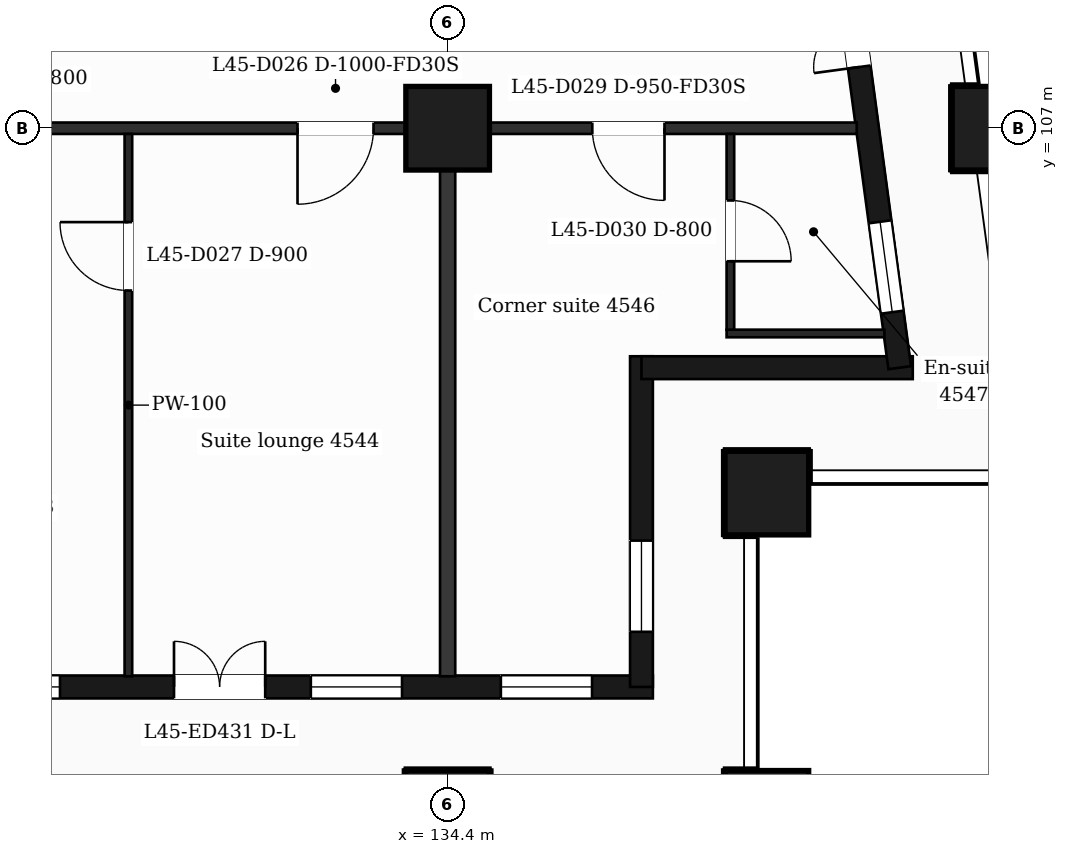
"""IFC4 building model, lengths in metres.
Left out: names, types, materials, properties, quantities, classifications, styles, units other than length and angle.
Written with IfcOpenShell. Run it as: python <this file> out.ifc"""

import sys

from ifc_helpers import new_model, si_unit, direction, frame, frame_2d, origin, origin_2d, place, context, subcontext, project, spatial, rectangle, extrude, element, fill, save


model = new_model("IFC4")
c1 = context("Model", 3, precision=1e-05, world=origin(), true_north=direction((0.0, 1.0)))
c2 = subcontext(c1, "Body", "Model", "MODEL_VIEW")
j1 = project(units=[si_unit("LENGTHUNIT", "METRE"), si_unit("PLANEANGLEUNIT", "RADIAN")], contexts=[c1])
p1 = place(None, origin())
s1 = spatial("IfcSite", under=j1, at=p1, CompositionType="ELEMENT")
p2 = place(p1, origin())
s2 = spatial("IfcBuilding", under=s1, at=p2, CompositionType="ELEMENT")
p3 = place(p2, frame((0.0, 0.0, 188.5)))
s3 = spatial("IfcBuildingStorey", under=s2, at=p3, CompositionType="ELEMENT", Elevation=188.5)
for number, where, z_axis, x_axis in (
    (1, (134.4, 98.0, 0.0), (0.0, 0.0, 1.0), (1.0, 0.0, 0.0)),
    (2, (138.6, 98.0, 0.0), (0.0, 0.0, 1.0), (1.0, 0.0, 0.0)),
    (3, (138.6, 102.2, 0.0), (0.0, 0.0, 1.0), (1.0, 0.0, 0.0)),
    (4, (134.4, 107.0, 0.0), (0.0, 0.0, 1.0), (1.0, 0.0, 0.0)),
    (5, (141.588, 107.0, 0.0), (0.0, 0.0, 1.0), (1.0, 0.0, 0.0)),
):
    element("IfcColumn", number, at=place(p3, frame(where, z_axis=z_axis, x_axis=x_axis)), inside=s3, PredefinedType="COLUMN", context=c2, shape_type="SweptSolid", body=[
        extrude(rectangle(XDim=1.1, YDim=1.1, at=origin_2d()), origin(), (0.0, 0.0, 1.0), 3.7),
    ])
p4 = place(p3, frame((89.85, 99.65, 0.0), z_axis=(0.0, 0.0, 1.0), x_axis=(1.0, 0.0, 0.0)))
e6 = element("IfcWall", 6, at=p4, inside=s3, PredefinedType="SOLIDWALL", context=c2, shape_type="SweptSolid", body=[
    extrude(rectangle(XDim=47.25, YDim=0.3, at=frame_2d((23.625, 0.0))), origin(), (0.0, 0.0, 1.0), 3.25),
])
p5 = place(p4, frame((0.725, 0.0, 0.9)))
e7 = element("IfcOpeningElement", 7, at=p5, cuts=e6, PredefinedType="OPENING", context=c2, shape_type="SweptSolid", body=[
    extrude(rectangle(XDim=1.2, YDim=2.1, at=frame_2d((0.6, 1.05))), frame((0.0, 0.16, 0.0), z_axis=(0.0, -1.0, 0.0), x_axis=(1.0, 0.0, 0.0)), (0.0, 0.0, 1.0), 0.32),
])
p6 = place(p4, frame((3.45, 0.0, 0.9)))
e8 = element("IfcOpeningElement", 8, at=p6, cuts=e6, PredefinedType="OPENING", context=c2, shape_type="SweptSolid", body=[
    extrude(rectangle(XDim=2.4, YDim=2.1, at=frame_2d((1.2, 1.05))), frame((0.0, 0.16, 0.0), z_axis=(0.0, -1.0, 0.0), x_axis=(1.0, 0.0, 0.0)), (0.0, 0.0, 1.0), 0.32),
])
p7 = place(p4, frame((7.65, 0.0, 0.9)))
e9 = element("IfcOpeningElement", 9, at=p7, cuts=e6, PredefinedType="OPENING", context=c2, shape_type="SweptSolid", body=[
    extrude(rectangle(XDim=2.4, YDim=2.1, at=frame_2d((1.2, 1.05))), frame((0.0, 0.16, 0.0), z_axis=(0.0, -1.0, 0.0), x_axis=(1.0, 0.0, 0.0)), (0.0, 0.0, 1.0), 0.32),
])
p8 = place(p4, frame((11.85, 0.0, 0.9)))
e10 = element("IfcOpeningElement", 10, at=p8, cuts=e6, PredefinedType="OPENING", context=c2, shape_type="SweptSolid", body=[
    extrude(rectangle(XDim=2.4, YDim=2.1, at=frame_2d((1.2, 1.05))), frame((0.0, 0.16, 0.0), z_axis=(0.0, -1.0, 0.0), x_axis=(1.0, 0.0, 0.0)), (0.0, 0.0, 1.0), 0.32),
])
p9 = place(p4, frame((16.05, 0.0, 0.9)))
e11 = element("IfcOpeningElement", 11, at=p9, cuts=e6, PredefinedType="OPENING", context=c2, shape_type="SweptSolid", body=[
    extrude(rectangle(XDim=2.4, YDim=2.1, at=frame_2d((1.2, 1.05))), frame((0.0, 0.16, 0.0), z_axis=(0.0, -1.0, 0.0), x_axis=(1.0, 0.0, 0.0)), (0.0, 0.0, 1.0), 0.32),
])
p10 = place(p4, frame((20.25, 0.0, 0.9)))
e12 = element("IfcOpeningElement", 12, at=p10, cuts=e6, PredefinedType="OPENING", context=c2, shape_type="SweptSolid", body=[
    extrude(rectangle(XDim=2.4, YDim=2.1, at=frame_2d((1.2, 1.05))), frame((0.0, 0.16, 0.0), z_axis=(0.0, -1.0, 0.0), x_axis=(1.0, 0.0, 0.0)), (0.0, 0.0, 1.0), 0.32),
])
p11 = place(p4, frame((25.05, 0.0, 0.9)))
e13 = element("IfcOpeningElement", 13, at=p11, cuts=e6, PredefinedType="OPENING", context=c2, shape_type="SweptSolid", body=[
    extrude(rectangle(XDim=1.2, YDim=2.1, at=frame_2d((0.6, 1.05))), frame((0.0, 0.16, 0.0), z_axis=(0.0, -1.0, 0.0), x_axis=(1.0, 0.0, 0.0)), (0.0, 0.0, 1.0), 0.32),
])
p12 = place(p4, frame((29.25, 0.0, 0.9)))
e14 = element("IfcOpeningElement", 14, at=p12, cuts=e6, PredefinedType="OPENING", context=c2, shape_type="SweptSolid", body=[
    extrude(rectangle(XDim=1.2, YDim=2.1, at=frame_2d((0.6, 1.05))), frame((0.0, 0.16, 0.0), z_axis=(0.0, -1.0, 0.0), x_axis=(1.0, 0.0, 0.0)), (0.0, 0.0, 1.0), 0.32),
])
p13 = place(p4, frame((32.55, 0.0, 0.0)))
e15 = element("IfcOpeningElement", 15, at=p13, cuts=e6, PredefinedType="OPENING", context=c2, shape_type="SweptSolid", body=[
    extrude(rectangle(XDim=1.2, YDim=2.4, at=frame_2d((0.6, 1.2))), frame((0.0, 0.16, 0.0), z_axis=(0.0, -1.0, 0.0), x_axis=(1.0, 0.0, 0.0)), (0.0, 0.0, 1.0), 0.32),
])
p14 = place(p4, frame((34.35, 0.0, 0.9)))
e16 = element("IfcOpeningElement", 16, at=p14, cuts=e6, PredefinedType="OPENING", context=c2, shape_type="SweptSolid", body=[
    extrude(rectangle(XDim=1.2, YDim=2.1, at=frame_2d((0.6, 1.05))), frame((0.0, 0.16, 0.0), z_axis=(0.0, -1.0, 0.0), x_axis=(1.0, 0.0, 0.0)), (0.0, 0.0, 1.0), 0.32),
])
p15 = place(p4, frame((37.05, 0.0, 0.9)))
e17 = element("IfcOpeningElement", 17, at=p15, cuts=e6, PredefinedType="OPENING", context=c2, shape_type="SweptSolid", body=[
    extrude(rectangle(XDim=2.4, YDim=2.1, at=frame_2d((1.2, 1.05))), frame((0.0, 0.16, 0.0), z_axis=(0.0, -1.0, 0.0), x_axis=(1.0, 0.0, 0.0)), (0.0, 0.0, 1.0), 0.32),
])
p16 = place(p4, frame((40.95, 0.0, 0.0)))
e18 = element("IfcOpeningElement", 18, at=p16, cuts=e6, PredefinedType="OPENING", context=c2, shape_type="SweptSolid", body=[
    extrude(rectangle(XDim=1.2, YDim=2.4, at=frame_2d((0.6, 1.2))), frame((0.0, 0.16, 0.0), z_axis=(0.0, -1.0, 0.0), x_axis=(1.0, 0.0, 0.0)), (0.0, 0.0, 1.0), 0.32),
])
p17 = place(p4, frame((42.75, 0.0, 0.9)))
e19 = element("IfcOpeningElement", 19, at=p17, cuts=e6, PredefinedType="OPENING", context=c2, shape_type="SweptSolid", body=[
    extrude(rectangle(XDim=1.2, YDim=2.1, at=frame_2d((0.6, 1.05))), frame((0.0, 0.16, 0.0), z_axis=(0.0, -1.0, 0.0), x_axis=(1.0, 0.0, 0.0)), (0.0, 0.0, 1.0), 0.32),
])
p18 = place(p4, frame((45.25, 0.0, 0.9)))
e20 = element("IfcOpeningElement", 20, at=p18, cuts=e6, PredefinedType="OPENING", context=c2, shape_type="SweptSolid", body=[
    extrude(rectangle(XDim=1.2, YDim=2.1, at=frame_2d((0.6, 1.05))), frame((0.0, 0.16, 0.0), z_axis=(0.0, -1.0, 0.0), x_axis=(1.0, 0.0, 0.0)), (0.0, 0.0, 1.0), 0.32),
])
p19 = place(p3, frame((136.95, 99.65, 0.0), z_axis=(0.0, 0.0, 1.0), x_axis=(0.0, 1.0, 0.0)))
e21 = element("IfcWall", 21, at=p19, inside=s3, PredefinedType="SOLIDWALL", context=c2, shape_type="SweptSolid", body=[
    extrude(rectangle(XDim=4.35, YDim=0.3, at=frame_2d((2.175, 0.0))), origin(), (0.0, 0.0, 1.0), 3.25),
])
p20 = place(p19, frame((0.725, 0.0, 0.9)))
e22 = element("IfcOpeningElement", 22, at=p20, cuts=e21, PredefinedType="OPENING", context=c2, shape_type="SweptSolid", body=[
    extrude(rectangle(XDim=1.2, YDim=2.1, at=frame_2d((0.6, 1.05))), frame((0.0, 0.16, 0.0), z_axis=(0.0, -1.0, 0.0), x_axis=(1.0, 0.0, 0.0)), (0.0, 0.0, 1.0), 0.32),
])
p21 = place(p3, frame((136.95, 103.85, 0.0), z_axis=(0.0, 0.0, 1.0), x_axis=(1.0, 0.0, 0.0)))
e23 = element("IfcWall", 23, at=p21, inside=s3, PredefinedType="SOLIDWALL", context=c2, shape_type="SweptSolid", body=[
    extrude(rectangle(XDim=3.569, YDim=0.3, at=frame_2d((1.785, 0.0))), origin(), (0.0, 0.0, 1.0), 3.25),
])
p22 = place(p3, frame((140.348, 103.85, 0.0), z_axis=(0.0, 0.0, 1.0), x_axis=(-0.133431549479, 0.991058031401, 0.0)))
e24 = element("IfcWall", 24, at=p22, inside=s3, PredefinedType="SOLIDWALL", context=c2, shape_type="SweptSolid", body=[
    extrude(rectangle(XDim=6.609, YDim=0.3, at=frame_2d((3.304, 0.0))), origin(), (0.0, 0.0, 1.0), 3.25),
])
p23 = place(p22, frame((0.737, 0.0, 0.9)))
e25 = element("IfcOpeningElement", 25, at=p23, cuts=e24, PredefinedType="OPENING", context=c2, shape_type="SweptSolid", body=[
    extrude(rectangle(XDim=1.2, YDim=2.1, at=frame_2d((0.6, 1.05))), frame((0.0, 0.16, 0.0), z_axis=(0.0, -1.0, 0.0), x_axis=(1.0, 0.0, 0.0)), (0.0, 0.0, 1.0), 0.32),
])
p24 = place(p22, frame((3.991, 0.0, 0.0)))
e26 = element("IfcOpeningElement", 26, at=p24, cuts=e24, PredefinedType="OPENING", context=c2, shape_type="SweptSolid", body=[
    extrude(rectangle(XDim=1.2, YDim=2.4, at=frame_2d((0.6, 1.2))), frame((0.0, 0.16, 0.0), z_axis=(0.0, -1.0, 0.0), x_axis=(1.0, 0.0, 0.0)), (0.0, 0.0, 1.0), 0.32),
])
p25 = place(p3, frame((138.07, 104.3, 0.0), z_axis=(0.0, 0.0, 1.0), x_axis=(1.0, 0.0, 0.0)))
e27 = element("IfcWall", 27, at=p25, inside=s3, PredefinedType="PARTITIONING", context=c2, shape_type="SweptSolid", body=[
    extrude(rectangle(XDim=2.076, YDim=0.1, at=frame_2d((1.038, 0.0))), origin(), (0.0, 0.0, 1.0), 3.25),
])
p26 = place(p3, frame((87.018, 107.0, 0.0), z_axis=(0.0, 0.0, 1.0), x_axis=(1.0, 0.0, 0.0)))
e28 = element("IfcWall", 28, at=p26, inside=s3, PredefinedType="PARTITIONING", context=c2, shape_type="SweptSolid", body=[
    extrude(rectangle(XDim=52.765, YDim=0.15, at=frame_2d((26.382, 0.0))), origin(), (0.0, 0.0, 1.0), 3.25),
])
p27 = place(p26, frame((0.87, 0.0, 0.0)))
e29 = element("IfcOpeningElement", 29, at=p27, cuts=e28, PredefinedType="OPENING", context=c2, shape_type="SweptSolid", body=[
    extrude(rectangle(XDim=0.95, YDim=2.1, at=frame_2d((0.475, 1.05))), frame((0.0, 0.085, 0.0), z_axis=(0.0, -1.0, 0.0), x_axis=(1.0, 0.0, 0.0)), (0.0, 0.0, 1.0), 0.17),
])
p28 = place(p26, frame((10.757, 0.0, 0.0)))
e30 = element("IfcOpeningElement", 30, at=p28, cuts=e28, PredefinedType="OPENING", context=c2, shape_type="SweptSolid", body=[
    extrude(rectangle(XDim=1.0, YDim=2.1, at=frame_2d((0.5, 1.05))), frame((0.0, 0.085, 0.0), z_axis=(0.0, -1.0, 0.0), x_axis=(1.0, 0.0, 0.0)), (0.0, 0.0, 1.0), 0.17),
])
p29 = place(p26, frame((20.432, 0.0, 0.0)))
e31 = element("IfcOpeningElement", 31, at=p29, cuts=e28, PredefinedType="OPENING", context=c2, shape_type="SweptSolid", body=[
    extrude(rectangle(XDim=0.95, YDim=2.1, at=frame_2d((0.475, 1.05))), frame((0.0, 0.085, 0.0), z_axis=(0.0, -1.0, 0.0), x_axis=(1.0, 0.0, 0.0)), (0.0, 0.0, 1.0), 0.17),
])
p30 = place(p26, frame((27.752, 0.0, 0.0)))
e32 = element("IfcOpeningElement", 32, at=p30, cuts=e28, PredefinedType="OPENING", context=c2, shape_type="SweptSolid", body=[
    extrude(rectangle(XDim=0.95, YDim=2.1, at=frame_2d((0.475, 1.05))), frame((0.0, 0.085, 0.0), z_axis=(0.0, -1.0, 0.0), x_axis=(1.0, 0.0, 0.0)), (0.0, 0.0, 1.0), 0.17),
])
p31 = place(p26, frame((33.557, 0.0, 0.0)))
e33 = element("IfcOpeningElement", 33, at=p31, cuts=e28, PredefinedType="OPENING", context=c2, shape_type="SweptSolid", body=[
    extrude(rectangle(XDim=0.95, YDim=2.1, at=frame_2d((0.475, 1.05))), frame((0.0, 0.085, 0.0), z_axis=(0.0, -1.0, 0.0), x_axis=(1.0, 0.0, 0.0)), (0.0, 0.0, 1.0), 0.17),
])
p32 = place(p26, frame((35.057, 0.0, 0.0)))
e34 = element("IfcOpeningElement", 34, at=p32, cuts=e28, PredefinedType="OPENING", context=c2, shape_type="SweptSolid", body=[
    extrude(rectangle(XDim=0.95, YDim=2.1, at=frame_2d((0.475, 1.05))), frame((0.0, 0.085, 0.0), z_axis=(0.0, -1.0, 0.0), x_axis=(1.0, 0.0, 0.0)), (0.0, 0.0, 1.0), 0.17),
])
p33 = place(p26, frame((45.407, 0.0, 0.0)))
e35 = element("IfcOpeningElement", 35, at=p33, cuts=e28, PredefinedType="OPENING", context=c2, shape_type="SweptSolid", body=[
    extrude(rectangle(XDim=1.0, YDim=2.1, at=frame_2d((0.5, 1.05))), frame((0.0, 0.085, 0.0), z_axis=(0.0, -1.0, 0.0), x_axis=(1.0, 0.0, 0.0)), (0.0, 0.0, 1.0), 0.17),
])
p34 = place(p26, frame((49.285, 0.0, 0.0)))
e36 = element("IfcOpeningElement", 36, at=p34, cuts=e28, PredefinedType="OPENING", context=c2, shape_type="SweptSolid", body=[
    extrude(rectangle(XDim=0.95, YDim=2.1, at=frame_2d((0.475, 1.05))), frame((0.0, 0.085, 0.0), z_axis=(0.0, -1.0, 0.0), x_axis=(1.0, 0.0, 0.0)), (0.0, 0.0, 1.0), 0.17),
])
p35 = place(p3, frame((130.2, 99.79, 0.0), z_axis=(0.0, 0.0, 1.0), x_axis=(0.0, 1.0, 0.0)))
e37 = element("IfcWall", 37, at=p35, inside=s3, PredefinedType="PARTITIONING", context=c2, shape_type="SweptSolid", body=[
    extrude(rectangle(XDim=7.135, YDim=0.1, at=frame_2d((3.567, 0.0))), origin(), (0.0, 0.0, 1.0), 3.25),
])
p36 = place(p35, frame((5.075, 0.0, 0.0)))
e38 = element("IfcOpeningElement", 38, at=p36, cuts=e37, PredefinedType="OPENING", context=c2, shape_type="SweptSolid", body=[
    extrude(rectangle(XDim=0.9, YDim=2.1, at=frame_2d((0.45, 1.05))), frame((0.0, 0.06, 0.0), z_axis=(0.0, -1.0, 0.0), x_axis=(1.0, 0.0, 0.0)), (0.0, 0.0, 1.0), 0.12),
])
p37 = place(p3, frame((134.4, 99.79, 0.0), z_axis=(0.0, 0.0, 1.0), x_axis=(0.0, 1.0, 0.0)))
e39 = element("IfcWall", 39, at=p37, inside=s3, PredefinedType="PARTITIONING", context=c2, shape_type="SweptSolid", body=[
    extrude(rectangle(XDim=7.135, YDim=0.2, at=frame_2d((3.567, 0.0))), origin(), (0.0, 0.0, 1.0), 3.25),
])
p38 = place(p3, frame((138.12, 104.35, 0.0), z_axis=(0.0, 0.0, 1.0), x_axis=(0.0, 1.0, 0.0)))
e40 = element("IfcWall", 40, at=p38, inside=s3, PredefinedType="PARTITIONING", context=c2, shape_type="SweptSolid", body=[
    extrude(rectangle(XDim=2.575, YDim=0.1, at=frame_2d((1.288, 0.0))), origin(), (0.0, 0.0, 1.0), 3.25),
])
p39 = place(p38, frame((0.9, 0.0, 0.0)))
e41 = element("IfcOpeningElement", 41, at=p39, cuts=e40, PredefinedType="OPENING", context=c2, shape_type="SweptSolid", body=[
    extrude(rectangle(XDim=0.8, YDim=2.1, at=frame_2d((0.4, 1.05))), frame((0.0, 0.06, 0.0), z_axis=(0.0, -1.0, 0.0), x_axis=(1.0, 0.0, 0.0)), (0.0, 0.0, 1.0), 0.12),
])
p40 = place(p15, origin())
e42 = element("IfcWindow", 42, at=p40, inside=s3, PartitioningType="SINGLE_PANEL", PredefinedType="WINDOW", context=c2, shape_type="SweptSolid", body=[
    extrude(rectangle(XDim=2.4, YDim=2.1, at=frame_2d((1.2, 1.05))), frame((0.0, 0.03, 0.0), z_axis=(0.0, -1.0, 0.0), x_axis=(1.0, 0.0, 0.0)), (0.0, 0.0, 1.0), 0.06),
])
fill(e17, e42)
p41 = place(p16, origin())
e43 = element("IfcDoor", 43, at=p41, inside=s3, OperationType="DOUBLE_DOOR_SINGLE_SWING", PredefinedType="DOOR", context=c2, shape_type="SweptSolid", body=[
    extrude(rectangle(XDim=1.2, YDim=2.4, at=frame_2d((0.6, 1.2))), frame((0.0, 0.025, 0.0), z_axis=(0.0, -1.0, 0.0), x_axis=(1.0, 0.0, 0.0)), (0.0, 0.0, 1.0), 0.05),
])
fill(e18, e43)
p42 = place(p17, origin())
e44 = element("IfcWindow", 44, at=p42, inside=s3, PartitioningType="SINGLE_PANEL", PredefinedType="WINDOW", context=c2, shape_type="SweptSolid", body=[
    extrude(rectangle(XDim=1.2, YDim=2.1, at=frame_2d((0.6, 1.05))), frame((0.0, 0.03, 0.0), z_axis=(0.0, -1.0, 0.0), x_axis=(1.0, 0.0, 0.0)), (0.0, 0.0, 1.0), 0.06),
])
fill(e19, e44)
p43 = place(p18, origin())
e45 = element("IfcWindow", 45, at=p43, inside=s3, PartitioningType="SINGLE_PANEL", PredefinedType="WINDOW", context=c2, shape_type="SweptSolid", body=[
    extrude(rectangle(XDim=1.2, YDim=2.1, at=frame_2d((0.6, 1.05))), frame((0.0, 0.03, 0.0), z_axis=(0.0, -1.0, 0.0), x_axis=(1.0, 0.0, 0.0)), (0.0, 0.0, 1.0), 0.06),
])
fill(e20, e45)
p44 = place(p20, origin())
e46 = element("IfcWindow", 46, at=p44, inside=s3, PartitioningType="SINGLE_PANEL", PredefinedType="WINDOW", context=c2, shape_type="SweptSolid", body=[
    extrude(rectangle(XDim=1.2, YDim=2.1, at=frame_2d((0.6, 1.05))), frame((0.0, 0.03, 0.0), z_axis=(0.0, -1.0, 0.0), x_axis=(1.0, 0.0, 0.0)), (0.0, 0.0, 1.0), 0.06),
])
fill(e22, e46)
p45 = place(p23, origin())
e47 = element("IfcWindow", 47, at=p45, inside=s3, PartitioningType="SINGLE_PANEL", PredefinedType="WINDOW", context=c2, shape_type="SweptSolid", body=[
    extrude(rectangle(XDim=1.2, YDim=2.1, at=frame_2d((0.6, 1.05))), frame((0.0, 0.03, 0.0), z_axis=(0.0, -1.0, 0.0), x_axis=(1.0, 0.0, 0.0)), (0.0, 0.0, 1.0), 0.06),
])
fill(e25, e47)
p46 = place(p24, origin())
e48 = element("IfcDoor", 48, at=p46, inside=s3, OperationType="DOUBLE_DOOR_SINGLE_SWING", PredefinedType="DOOR", context=c2, shape_type="SweptSolid", body=[
    extrude(rectangle(XDim=1.2, YDim=2.4, at=frame_2d((0.6, 1.2))), frame((0.0, 0.025, 0.0), z_axis=(0.0, -1.0, 0.0), x_axis=(1.0, 0.0, 0.0)), (0.0, 0.0, 1.0), 0.05),
])
fill(e26, e48)
p47 = place(p33, origin())
e49 = element("IfcDoor", 49, at=p47, inside=s3, OperationType="SINGLE_SWING_LEFT", PredefinedType="DOOR", context=c2, shape_type="SweptSolid", body=[
    extrude(rectangle(XDim=1.0, YDim=2.1, at=frame_2d((0.5, 1.05))), frame((0.0, 0.025, 0.0), z_axis=(0.0, -1.0, 0.0), x_axis=(1.0, 0.0, 0.0)), (0.0, 0.0, 1.0), 0.05),
])
fill(e35, e49)
p48 = place(p36, origin())
e50 = element("IfcDoor", 50, at=p48, inside=s3, OperationType="SINGLE_SWING_RIGHT", PredefinedType="DOOR", context=c2, shape_type="SweptSolid", body=[
    extrude(rectangle(XDim=0.9, YDim=2.1, at=frame_2d((0.45, 1.05))), frame((0.0, 0.025, 0.0), z_axis=(0.0, -1.0, 0.0), x_axis=(1.0, 0.0, 0.0)), (0.0, 0.0, 1.0), 0.05),
])
fill(e38, e50)
p49 = place(p34, origin())
e51 = element("IfcDoor", 51, at=p49, inside=s3, OperationType="SINGLE_SWING_RIGHT", PredefinedType="DOOR", context=c2, shape_type="SweptSolid", body=[
    extrude(rectangle(XDim=0.95, YDim=2.1, at=frame_2d((0.475, 1.05))), frame((0.0, 0.025, 0.0), z_axis=(0.0, -1.0, 0.0), x_axis=(1.0, 0.0, 0.0)), (0.0, 0.0, 1.0), 0.05),
])
fill(e36, e51)
p50 = place(p39, origin())
e52 = element("IfcDoor", 52, at=p50, inside=s3, OperationType="SINGLE_SWING_LEFT", PredefinedType="DOOR", context=c2, shape_type="SweptSolid", body=[
    extrude(rectangle(XDim=0.8, YDim=2.1, at=frame_2d((0.4, 1.05))), frame((0.0, 0.025, 0.0), z_axis=(0.0, -1.0, 0.0), x_axis=(1.0, 0.0, 0.0)), (0.0, 0.0, 1.0), 0.05),
])
fill(e41, e52)
save(model, sys.argv[1])
